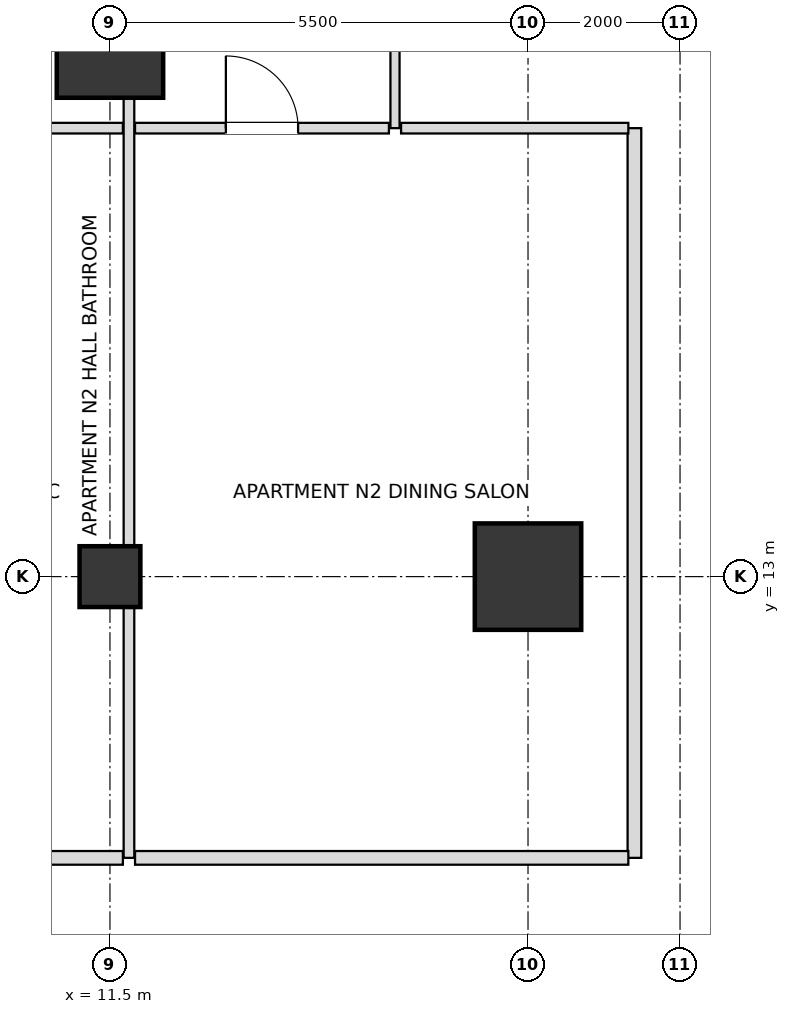
"""IFC4 building model, lengths in metres.
Left out: names, types, materials, properties, quantities, classifications, styles, units other than length and angle.
Written with IfcOpenShell. Run it as: python <this file> out.ifc"""

import sys

from ifc_helpers import new_model, si_unit, direction, frame, frame_2d, origin, origin_2d, place, context, subcontext, project, spatial, rectangle, extrude, element, fill, save


model = new_model("IFC4")
c1 = context("Model", 3, precision=1e-05, world=origin(), true_north=direction((0.0, 1.0)))
c2 = subcontext(c1, "Body", "Model", "MODEL_VIEW")
j1 = project(units=[si_unit("LENGTHUNIT", "METRE"), si_unit("PLANEANGLEUNIT", "RADIAN")], contexts=[c1])
p1 = place(None, origin())
s1 = spatial("IfcSite", under=j1, at=p1, CompositionType="ELEMENT")
p2 = place(p1, origin())
s2 = spatial("IfcBuilding", under=s1, at=p2, CompositionType="ELEMENT")
p3 = place(p2, frame((0.0, 0.0, 64.8)))
s3 = spatial("IfcBuildingStorey", under=s2, at=p3, CompositionType="ELEMENT", Elevation=64.8)
for number, where, z_axis, x_axis in (
    (1, (17.0, 13.0, 0.0), (0.0, 0.0, 1.0), (1.0, 0.0, 0.0)),
    (2, (11.5, 20.0, 0.0), (0.0, 0.0, 1.0), (1.0, 0.0, 0.0)),
):
    element("IfcColumn", number, at=place(p3, frame(where, z_axis=z_axis, x_axis=x_axis)), inside=s3, PredefinedType="USERDEFINED", context=c2, shape_type="SweptSolid", body=[
        extrude(rectangle(XDim=1.4, YDim=1.4, at=origin_2d()), origin(), (0.0, 0.0, 1.0), 3.6),
    ])
p4 = place(p3, frame((11.5, 13.0, 0.0), z_axis=(0.0, 0.0, 1.0), x_axis=(1.0, 0.0, 0.0)))
e3 = element("IfcColumn", 3, at=p4, inside=s3, PredefinedType="COLUMN", context=c2, shape_type="SweptSolid", body=[
    extrude(rectangle(XDim=0.8, YDim=0.8, at=origin_2d()), origin(), (0.0, 0.0, 1.0), 3.6),
])
p5 = place(p3, frame((11.75, 9.3, 0.0), z_axis=(0.0, 0.0, 1.0), x_axis=(0.0, 1.0, 0.0)))
e4 = element("IfcWall", 4, at=p5, inside=s3, PredefinedType="PARTITIONING", context=c2, shape_type="SweptSolid", body=[
    extrude(rectangle(XDim=15.6, YDim=0.14, at=frame_2d((7.8, 0.0))), origin(), (0.0, 0.0, 1.0), 2.736),
])
p6 = place(p5, frame((12.15, 0.0, 0.0)))
e5 = element("IfcOpeningElement", 5, at=p6, cuts=e4, PredefinedType="OPENING", context=c2, shape_type="SweptSolid", body=[
    extrude(rectangle(XDim=0.9, YDim=2.1, at=frame_2d((0.45, 1.05))), frame((0.0, 0.08, 0.0), z_axis=(0.0, -1.0, 0.0), x_axis=(1.0, 0.0, 0.0)), (0.0, 0.0, 1.0), 0.16),
])
p7 = place(p3, frame((15.25, 18.9, 0.0), z_axis=(0.0, 0.0, 1.0), x_axis=(0.0, 1.0, 0.0)))
e6 = element("IfcWall", 6, at=p7, inside=s3, PredefinedType="PARTITIONING", context=c2, shape_type="SweptSolid", body=[
    extrude(rectangle(XDim=6.0, YDim=0.12, at=frame_2d((3.0, 0.0))), origin(), (0.0, 0.0, 1.0), 2.736),
])
p8 = place(p7, frame((2.55, 0.0, 0.0)))
e7 = element("IfcOpeningElement", 7, at=p8, cuts=e6, PredefinedType="OPENING", context=c2, shape_type="SweptSolid", body=[
    extrude(rectangle(XDim=0.9, YDim=2.1, at=frame_2d((0.45, 1.05))), frame((0.0, 0.07, 0.0), z_axis=(0.0, -1.0, 0.0), x_axis=(1.0, 0.0, 0.0)), (0.0, 0.0, 1.0), 0.14),
])
p9 = place(p3, frame((18.4, 9.3, 0.0), z_axis=(0.0, 0.0, 1.0), x_axis=(0.0, 1.0, 0.0)))
e8 = element("IfcWall", 8, at=p9, inside=s3, PredefinedType="PARTITIONING", context=c2, shape_type="SweptSolid", body=[
    extrude(rectangle(XDim=9.6, YDim=0.18, at=frame_2d((4.8, 0.0))), origin(), (0.0, 0.0, 1.0), 2.736),
])
p10 = place(p3, frame((9.88, 9.3, 0.0), z_axis=(0.0, 0.0, 1.0), x_axis=(1.0, 0.0, 0.0)))
e9 = element("IfcWall", 9, at=p10, inside=s3, PredefinedType="PARTITIONING", context=c2, shape_type="SweptSolid", body=[
    extrude(rectangle(XDim=1.79, YDim=0.18, at=frame_2d((0.895, 0.0))), origin(), (0.0, 0.0, 1.0), 3.38),
])
p11 = place(p3, frame((11.83, 9.3, 0.0), z_axis=(0.0, 0.0, 1.0), x_axis=(1.0, 0.0, 0.0)))
e10 = element("IfcWall", 10, at=p11, inside=s3, PredefinedType="PARTITIONING", context=c2, shape_type="SweptSolid", body=[
    extrude(rectangle(XDim=6.49, YDim=0.18, at=frame_2d((3.245, 0.0))), origin(), (0.0, 0.0, 1.0), 2.816),
])
p12 = place(p3, frame((9.88, 18.9, 0.0), z_axis=(0.0, 0.0, 1.0), x_axis=(1.0, 0.0, 0.0)))
e11 = element("IfcWall", 11, at=p12, inside=s3, PredefinedType="PARTITIONING", context=c2, shape_type="SweptSolid", body=[
    extrude(rectangle(XDim=1.79, YDim=0.14, at=frame_2d((0.895, 0.0))), origin(), (0.0, 0.0, 1.0), 2.736),
])
p13 = place(p3, frame((11.83, 18.9, 0.0), z_axis=(0.0, 0.0, 1.0), x_axis=(1.0, 0.0, 0.0)))
e12 = element("IfcWall", 12, at=p13, inside=s3, PredefinedType="PARTITIONING", context=c2, shape_type="SweptSolid", body=[
    extrude(rectangle(XDim=3.34, YDim=0.14, at=frame_2d((1.67, 0.0))), origin(), (0.0, 0.0, 1.0), 2.736),
])
p14 = place(p13, frame((1.195, 0.0, 0.0)))
e13 = element("IfcOpeningElement", 13, at=p14, cuts=e12, PredefinedType="OPENING", context=c2, shape_type="SweptSolid", body=[
    extrude(rectangle(XDim=0.95, YDim=2.1, at=frame_2d((0.475, 1.05))), frame((0.0, 0.08, 0.0), z_axis=(0.0, -1.0, 0.0), x_axis=(1.0, 0.0, 0.0)), (0.0, 0.0, 1.0), 0.16),
])
p15 = place(p3, frame((15.33, 18.9, 0.0), z_axis=(0.0, 0.0, 1.0), x_axis=(1.0, 0.0, 0.0)))
e14 = element("IfcWall", 14, at=p15, inside=s3, PredefinedType="PARTITIONING", context=c2, shape_type="SweptSolid", body=[
    extrude(rectangle(XDim=2.99, YDim=0.14, at=frame_2d((1.495, 0.0))), origin(), (0.0, 0.0, 1.0), 2.736),
])
p16 = place(p14, origin())
e15 = element("IfcDoor", 15, at=p16, inside=s3, OperationType="SINGLE_SWING_LEFT", PredefinedType="DOOR", context=c2, shape_type="SweptSolid", body=[
    extrude(rectangle(XDim=0.95, YDim=2.1, at=frame_2d((0.475, 1.05))), frame((0.0, 0.025, 0.0), z_axis=(0.0, -1.0, 0.0), x_axis=(1.0, 0.0, 0.0)), (0.0, 0.0, 1.0), 0.05),
])
fill(e13, e15)
save(model, sys.argv[1])
